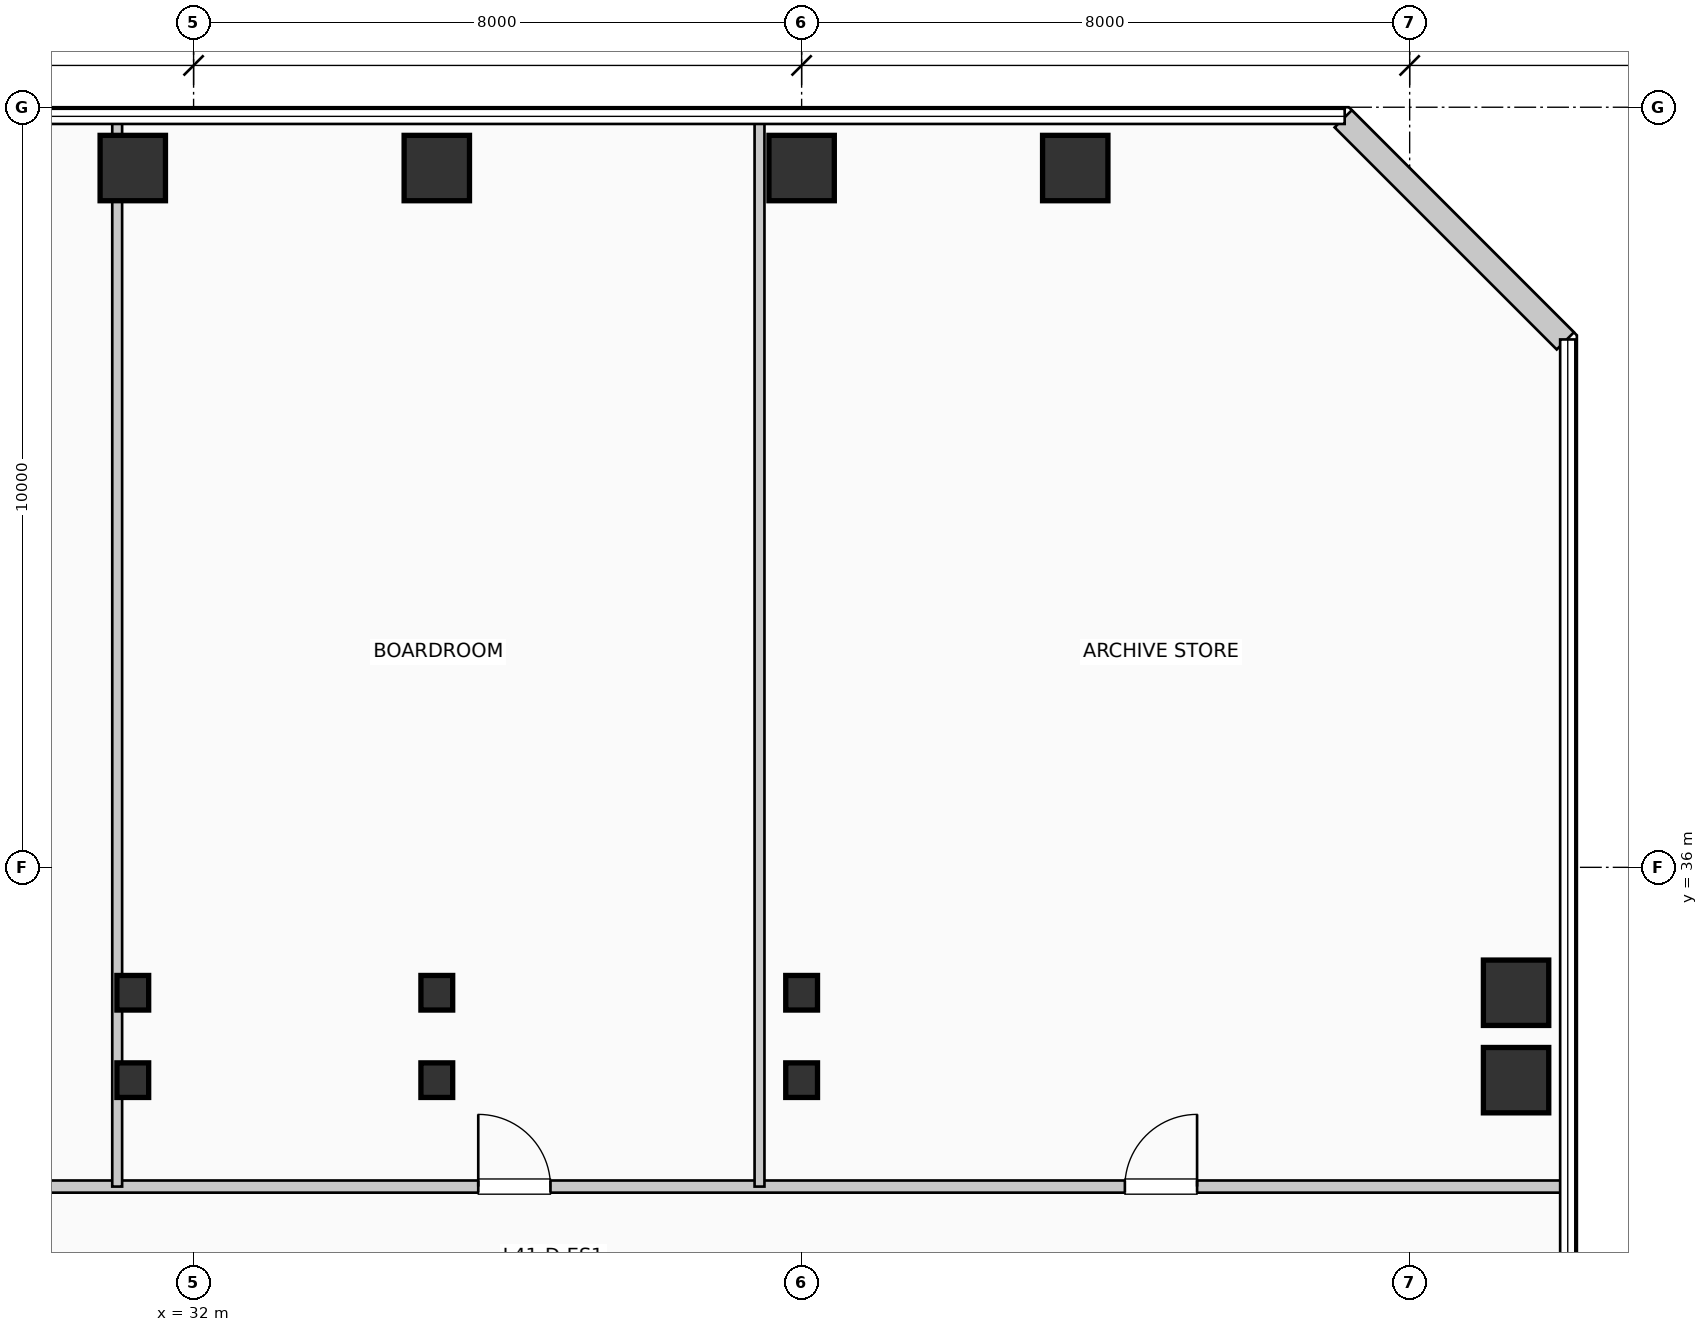
"""IFC4 building model, lengths in metres.
Left out: names, types, materials, properties, quantities, classifications, styles, units other than length and angle.
Written with IfcOpenShell. Run it as: python <this file> out.ifc"""

import sys

from ifc_helpers import new_model, si_unit, direction, frame, frame_2d, origin, origin_2d, place, context, subcontext, project, spatial, rectangle, i_section, extrude, element, fill, save


model = new_model("IFC4")
c1 = context("Model", 3, precision=1e-05, world=origin(), true_north=direction((0.0, 1.0)))
c2 = subcontext(c1, "Body", "Model", "MODEL_VIEW")
j1 = project(units=[si_unit("LENGTHUNIT", "METRE"), si_unit("PLANEANGLEUNIT", "RADIAN")], contexts=[c1])
p1 = place(None, origin())
s1 = spatial("IfcSite", under=j1, at=p1, CompositionType="ELEMENT")
p2 = place(p1, origin())
s2 = spatial("IfcBuilding", under=s1, at=p2, CompositionType="ELEMENT")
p3 = place(p2, frame((0.0, 0.0, 170.61)))
s3 = spatial("IfcBuildingStorey", under=s2, at=p3, CompositionType="ELEMENT", Elevation=170.61)
for number, where, z_axis, x_axis in (
    (1, (31.2, 33.2, 0.0), (0.0, 0.0, 1.0), (1.0, 0.0, 0.0)),
    (2, (31.2, 34.35, 0.0), (0.0, 0.0, 1.0), (1.0, 0.0, 0.0)),
):
    element("IfcColumn", number, at=place(p3, frame(where, z_axis=z_axis, x_axis=x_axis)), inside=s3, PredefinedType="COLUMN", context=c2, shape_type="SweptSolid", body=[
        extrude(i_section(OverallWidth=0.418, OverallDepth=0.455, WebThickness=0.032, FlangeThickness=0.051, at=origin_2d()), origin(), (0.0, 0.0, 1.0), 3.96),
    ])
p4 = place(p3, frame((31.2, 45.2, 0.0), z_axis=(0.0, 0.0, 1.0), x_axis=(1.0, 0.0, 0.0)))
e3 = element("IfcColumn", 3, at=p4, inside=s3, PredefinedType="COLUMN", context=c2, shape_type="SweptSolid", body=[
    extrude(rectangle(XDim=0.86, YDim=0.86, at=origin_2d()), origin(), (0.0, 0.0, 1.0), 3.96),
])
for number, where, z_axis, x_axis in (
    (4, (35.2, 33.2, 0.0), (0.0, 0.0, 1.0), (1.0, 0.0, 0.0)),
    (5, (35.2, 34.35, 0.0), (0.0, 0.0, 1.0), (1.0, 0.0, 0.0)),
):
    element("IfcColumn", number, at=place(p3, frame(where, z_axis=z_axis, x_axis=x_axis)), inside=s3, PredefinedType="COLUMN", context=c2, shape_type="SweptSolid", body=[
        extrude(i_section(OverallWidth=0.418, OverallDepth=0.455, WebThickness=0.032, FlangeThickness=0.051, at=origin_2d()), origin(), (0.0, 0.0, 1.0), 3.96),
    ])
p5 = place(p3, frame((35.2, 45.2, 0.0), z_axis=(0.0, 0.0, 1.0), x_axis=(1.0, 0.0, 0.0)))
e6 = element("IfcColumn", 6, at=p5, inside=s3, PredefinedType="COLUMN", context=c2, shape_type="SweptSolid", body=[
    extrude(rectangle(XDim=0.86, YDim=0.86, at=origin_2d()), origin(), (0.0, 0.0, 1.0), 3.96),
])
for number, where, z_axis, x_axis in (
    (7, (40.0, 33.2, 0.0), (0.0, 0.0, 1.0), (1.0, 0.0, 0.0)),
    (8, (40.0, 34.35, 0.0), (0.0, 0.0, 1.0), (1.0, 0.0, 0.0)),
):
    element("IfcColumn", number, at=place(p3, frame(where, z_axis=z_axis, x_axis=x_axis)), inside=s3, PredefinedType="COLUMN", context=c2, shape_type="SweptSolid", body=[
        extrude(i_section(OverallWidth=0.418, OverallDepth=0.455, WebThickness=0.032, FlangeThickness=0.051, at=origin_2d()), origin(), (0.0, 0.0, 1.0), 3.96),
    ])
for number, where, z_axis, x_axis in (
    (9, (40.0, 45.2, 0.0), (0.0, 0.0, 1.0), (1.0, 0.0, 0.0)),
    (10, (43.6, 45.2, 0.0), (0.0, 0.0, 1.0), (1.0, 0.0, 0.0)),
    (11, (49.4, 33.2, 0.0), (0.0, 0.0, 1.0), (1.0, 0.0, 0.0)),
    (12, (49.4, 34.35, 0.0), (0.0, 0.0, 1.0), (1.0, 0.0, 0.0)),
):
    element("IfcColumn", number, at=place(p3, frame(where, z_axis=z_axis, x_axis=x_axis)), inside=s3, PredefinedType="COLUMN", context=c2, shape_type="SweptSolid", body=[
        extrude(rectangle(XDim=0.86, YDim=0.86, at=origin_2d()), origin(), (0.0, 0.0, 1.0), 3.96),
    ])
p6 = place(p3, frame((50.048, 42.926, 0.0), z_axis=(0.0, 0.0, 1.0), x_axis=(-0.707136318428, 0.707077242712, 0.0)))
e13 = element("IfcWall", 13, at=p6, inside=s3, PredefinedType="SOLIDWALL", context=c2, shape_type="SweptSolid", body=[
    extrude(rectangle(XDim=4.133, YDim=0.32, at=frame_2d((2.066, 0.0))), origin(), (0.0, 0.0, 1.0), 3.61),
])
p7 = place(p3, frame((23.6, 31.8, 0.0), z_axis=(0.0, 0.0, 1.0), x_axis=(1.0, 0.0, 0.0)))
e14 = element("IfcWall", 14, at=p7, inside=s3, PredefinedType="PARTITIONING", context=c2, shape_type="SweptSolid", body=[
    extrude(rectangle(XDim=26.41, YDim=0.16, at=frame_2d((13.205, 0.0))), origin(), (0.0, 0.0, 1.0), 3.61),
])
p8 = place(p7, frame((3.222, 0.0, 0.0)))
e15 = element("IfcOpeningElement", 15, at=p8, cuts=e14, PredefinedType="OPENING", context=c2, shape_type="SweptSolid", body=[
    extrude(rectangle(XDim=0.95, YDim=2.15, at=frame_2d((0.475, 1.075))), frame((0.0, 0.09, 0.0), z_axis=(0.0, -1.0, 0.0), x_axis=(1.0, 0.0, 0.0)), (0.0, 0.0, 1.0), 0.18),
])
p9 = place(p7, frame((12.146, 0.0, 0.0)))
e16 = element("IfcOpeningElement", 16, at=p9, cuts=e14, PredefinedType="OPENING", context=c2, shape_type="SweptSolid", body=[
    extrude(rectangle(XDim=0.95, YDim=2.15, at=frame_2d((0.475, 1.075))), frame((0.0, 0.09, 0.0), z_axis=(0.0, -1.0, 0.0), x_axis=(1.0, 0.0, 0.0)), (0.0, 0.0, 1.0), 0.18),
])
p10 = place(p7, frame((20.653, 0.0, 0.0)))
e17 = element("IfcOpeningElement", 17, at=p10, cuts=e14, PredefinedType="OPENING", context=c2, shape_type="SweptSolid", body=[
    extrude(rectangle(XDim=0.95, YDim=2.15, at=frame_2d((0.475, 1.075))), frame((0.0, 0.09, 0.0), z_axis=(0.0, -1.0, 0.0), x_axis=(1.0, 0.0, 0.0)), (0.0, 0.0, 1.0), 0.18),
])
p11 = place(p3, frame((30.995, 31.8, 0.0), z_axis=(0.0, 0.0, 1.0), x_axis=(0.0, 1.0, 0.0)))
e18 = element("IfcWall", 18, at=p11, inside=s3, PredefinedType="PARTITIONING", context=c2, shape_type="SweptSolid", body=[
    extrude(rectangle(XDim=14.01, YDim=0.13, at=frame_2d((7.005, 0.0))), origin(), (0.0, 0.0, 1.0), 2.945),
])
p12 = place(p3, frame((39.446, 31.8, 0.0), z_axis=(0.0, 0.0, 1.0), x_axis=(0.0, 1.0, 0.0)))
e19 = element("IfcWall", 19, at=p12, inside=s3, PredefinedType="PARTITIONING", context=c2, shape_type="SweptSolid", body=[
    extrude(rectangle(XDim=14.01, YDim=0.13, at=frame_2d((7.005, 0.0))), origin(), (0.0, 0.0, 1.0), 3.61),
])
p13 = place(p9, origin())
e20 = element("IfcDoor", 20, at=p13, inside=s3, OperationType="SINGLE_SWING_LEFT", PredefinedType="DOOR", context=c2, shape_type="SweptSolid", body=[
    extrude(rectangle(XDim=0.95, YDim=2.15, at=frame_2d((0.475, 1.075))), frame((0.0, 0.025, 0.0), z_axis=(0.0, -1.0, 0.0), x_axis=(1.0, 0.0, 0.0)), (0.0, 0.0, 1.0), 0.05),
])
fill(e16, e20)
p14 = place(p10, origin())
e21 = element("IfcDoor", 21, at=p14, inside=s3, OperationType="SINGLE_SWING_RIGHT", PredefinedType="DOOR", context=c2, shape_type="SweptSolid", body=[
    extrude(rectangle(XDim=0.95, YDim=2.15, at=frame_2d((0.475, 1.075))), frame((0.0, 0.025, 0.0), z_axis=(0.0, -1.0, 0.0), x_axis=(1.0, 0.0, 0.0)), (0.0, 0.0, 1.0), 0.05),
])
fill(e17, e21)
save(model, sys.argv[1])
